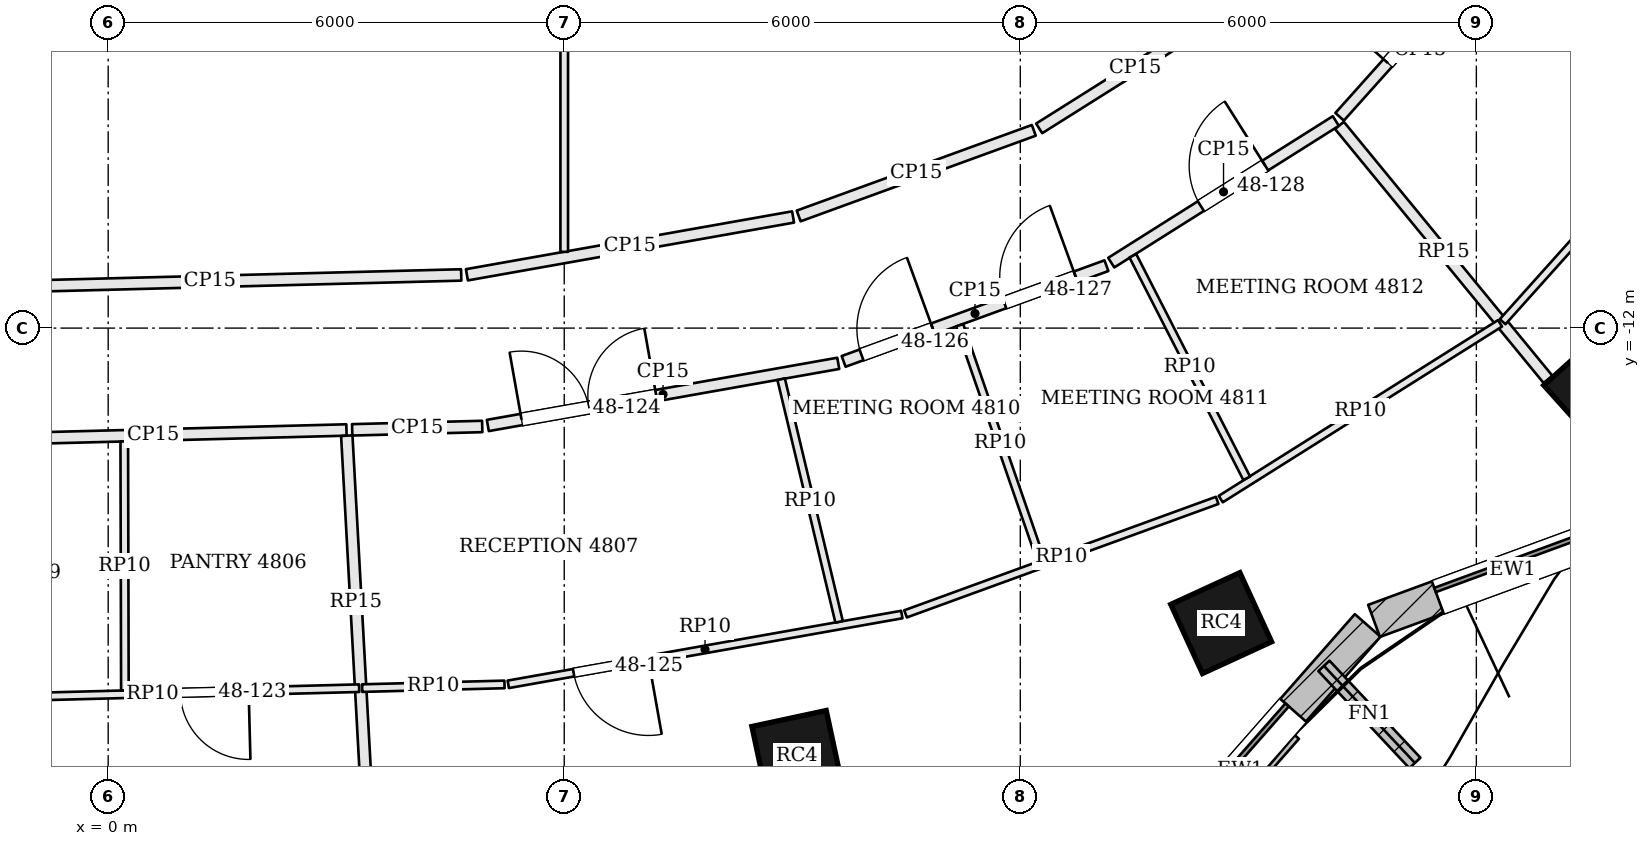
"""IFC4 building model, lengths in metres.
Left out: names, types, materials, properties, quantities, classifications, styles, units other than length and angle.
Written with IfcOpenShell. Run it as: python <this file> out.ifc"""

import sys

from ifc_helpers import new_model, si_unit, direction, frame, frame_2d, origin, origin_2d, place, context, subcontext, project, spatial, rectangle, extrude, element, fill, save


model = new_model("IFC4")
c1 = context("Model", 3, precision=1e-05, world=origin(), true_north=direction((0.0, 1.0)))
c2 = subcontext(c1, "Body", "Model", "MODEL_VIEW")
j1 = project(units=[si_unit("LENGTHUNIT", "METRE"), si_unit("PLANEANGLEUNIT", "RADIAN")], contexts=[c1])
p1 = place(None, origin())
s1 = spatial("IfcSite", under=j1, at=p1, CompositionType="ELEMENT")
p2 = place(p1, origin())
s2 = spatial("IfcBuilding", under=s1, at=p2, CompositionType="ELEMENT")
p3 = place(p2, frame((0.0, 0.0, 197.4)))
s3 = spatial("IfcBuildingStorey", under=s2, at=p3, CompositionType="ELEMENT", Elevation=197.4)
for number, where, z_axis, x_axis in (
    (1, (9.063, -17.625, 0.0), (0.0, 0.0, 1.0), (0.978, 0.21, 0.0)),
    (2, (14.643, -15.881, 0.0), (0.0, 0.0, 1.0), (0.909, 0.417, 0.0)),
    (3, (19.593, -12.79, 0.0), (0.0, 0.0, 1.0), (0.744, 0.668, 0.0)),
):
    element("IfcColumn", number, at=place(p3, frame(where, z_axis=z_axis, x_axis=x_axis)), inside=s3, PredefinedType="COLUMN", context=c2, shape_type="SweptSolid", body=[
        extrude(rectangle(XDim=1.0, YDim=1.0, at=origin_2d()), origin(), (0.0, 0.0, 1.0), 3.9),
    ])
p4 = place(p3, frame((13.221, -19.719, 0.0), z_axis=(0.0, 0.0, 1.0), x_axis=(0.660424908916, 0.750892095899, 0.0)))
e4 = element("IfcWall", 4, at=p4, inside=s3, PredefinedType="SOLIDWALL", context=c2, shape_type="SweptSolid", body=[
    extrude(rectangle(XDim=5.071, YDim=0.45, at=frame_2d((2.535, 0.0))), origin(), (0.0, 0.0, 1.0), 3.7),
])
p5 = place(p4, frame((1.485, 0.0, 0.9)))
e5 = element("IfcOpeningElement", 5, at=p5, cuts=e4, PredefinedType="OPENING", context=c2, shape_type="SweptSolid", body=[
    extrude(rectangle(XDim=2.1, YDim=2.3, at=frame_2d((1.05, 1.15))), frame((0.0, 0.235, 0.0), z_axis=(0.0, -1.0, 0.0), x_axis=(1.0, 0.0, 0.0)), (0.0, 0.0, 1.0), 0.47),
])
p6 = place(p3, frame((16.654, -15.852, 0.0), z_axis=(0.0, 0.0, 1.0), x_axis=(0.938636568132, 0.344907803572, 0.0)))
e6 = element("IfcWall", 6, at=p6, inside=s3, PredefinedType="SOLIDWALL", context=c2, shape_type="SweptSolid", body=[
    extrude(rectangle(XDim=3.887, YDim=0.45, at=frame_2d((1.944, 0.0))), origin(), (0.0, 0.0, 1.0), 3.7),
])
p7 = place(p6, frame((0.894, 0.0, 0.9)))
e7 = element("IfcOpeningElement", 7, at=p7, cuts=e6, PredefinedType="OPENING", context=c2, shape_type="SweptSolid", body=[
    extrude(rectangle(XDim=2.1, YDim=2.3, at=frame_2d((1.05, 1.15))), frame((0.0, 0.235, 0.0), z_axis=(0.0, -1.0, 0.0), x_axis=(1.0, 0.0, 0.0)), (0.0, 0.0, 1.0), 0.47),
])
p8 = place(p3, frame((15.995, -16.444, 0.0), z_axis=(0.0, 0.0, 1.0), x_axis=(0.683852936488, -0.729619874494, 0.0)))
e8 = element("IfcWall", 8, at=p8, inside=s3, PredefinedType="SOLIDWALL", context=c2, shape_type="SweptSolid", body=[
    extrude(rectangle(XDim=1.75, YDim=0.2, at=frame_2d((0.875, 0.0))), origin(), (0.0, 0.0, 1.0), 3.7),
])
p9 = place(p3, frame((13.339, -19.822, 3.9), z_axis=(0.0, 0.0, 1.0), x_axis=(0.660445690116, 0.7508738179, 0.0)))
e9 = element("IfcWall", 9, at=p9, inside=s3, PredefinedType="PARAPET", context=c2, shape_type="SweptSolid", body=[
    extrude(rectangle(XDim=3.353, YDim=0.3, at=frame_2d((1.677, 0.0))), origin(), (0.0, 0.0, 1.0), 1.1),
])
p10 = place(p3, frame((-1.951, -13.472, 0.0), z_axis=(0.0, 0.0, 1.0), x_axis=(0.999664235233, 0.025911711565, 0.0)))
e10 = element("IfcWall", 10, at=p10, inside=s3, PredefinedType="PARTITIONING", context=c2, shape_type="SweptSolid", body=[
    extrude(rectangle(XDim=5.088, YDim=0.15, at=frame_2d((2.544, 0.0))), origin(), (0.0, 0.0, 1.0), 3.084),
])
p11 = place(p3, frame((3.38, -17.801, 0.0), z_axis=(0.0, 0.0, 1.0), x_axis=(-0.054860476936, 0.998494030062, 0.0)))
e11 = element("IfcWall", 11, at=p11, inside=s3, PredefinedType="PARTITIONING", context=c2, shape_type="SweptSolid", body=[
    extrude(rectangle(XDim=4.392, YDim=0.15, at=frame_2d((2.196, 0.0))), origin(), (0.0, 0.0, 1.0), 3.084),
])
p12 = place(p3, frame((3.21, -13.339, 0.0), z_axis=(0.0, 0.0, 1.0), x_axis=(0.999662941738, 0.025961566124, 0.0)))
e12 = element("IfcWall", 12, at=p12, inside=s3, PredefinedType="PARTITIONING", context=c2, shape_type="SweptSolid", body=[
    extrude(rectangle(XDim=1.711, YDim=0.15, at=frame_2d((0.856, 0.0))), origin(), (0.0, 0.0, 1.0), 3.084),
])
p13 = place(p3, frame((4.995, -13.281, 0.0), z_axis=(0.0, 0.0, 1.0), x_axis=(0.98463411377, 0.174630071865, 0.0)))
e13 = element("IfcWall", 13, at=p13, inside=s3, PredefinedType="PARTITIONING", context=c2, shape_type="SweptSolid", body=[
    extrude(rectangle(XDim=4.682, YDim=0.15, at=frame_2d((2.341, 0.0))), origin(), (0.0, 0.0, 1.0), 3.084),
])
p14 = place(p13, frame((0.45, 0.0, 0.0)))
e14 = element("IfcOpeningElement", 14, at=p14, cuts=e13, PredefinedType="OPENING", context=c2, shape_type="SweptSolid", body=[
    extrude(rectangle(XDim=1.8, YDim=2.1, at=frame_2d((0.9, 1.05))), frame((0.0, 0.085, 0.0), z_axis=(0.0, -1.0, 0.0), x_axis=(1.0, 0.0, 0.0)), (0.0, 0.0, 1.0), 0.17),
])
p15 = place(p3, frame((9.676, -12.438, 0.0), z_axis=(0.0, 0.0, 1.0), x_axis=(0.939640289748, 0.342163887461, 0.0)))
e15 = element("IfcWall", 15, at=p15, inside=s3, PredefinedType="PARTITIONING", context=c2, shape_type="SweptSolid", body=[
    extrude(rectangle(XDim=3.68, YDim=0.15, at=frame_2d((1.84, 0.0))), origin(), (0.0, 0.0, 1.0), 3.084),
])
p16 = place(p15, frame((0.25, 0.0, 0.0)))
e16 = element("IfcOpeningElement", 16, at=p16, cuts=e15, PredefinedType="OPENING", context=c2, shape_type="SweptSolid", body=[
    extrude(rectangle(XDim=1.0, YDim=2.4, at=frame_2d((0.5, 1.2))), frame((0.0, 0.085, 0.0), z_axis=(0.0, -1.0, 0.0), x_axis=(1.0, 0.0, 0.0)), (0.0, 0.0, 1.0), 0.17),
])
p17 = place(p15, frame((2.25, 0.0, 0.0)))
e17 = element("IfcOpeningElement", 17, at=p17, cuts=e15, PredefinedType="OPENING", context=c2, shape_type="SweptSolid", body=[
    extrude(rectangle(XDim=1.0, YDim=2.4, at=frame_2d((0.5, 1.2))), frame((0.0, 0.085, 0.0), z_axis=(0.0, -1.0, 0.0), x_axis=(1.0, 0.0, 0.0)), (0.0, 0.0, 1.0), 0.17),
])
p18 = place(p3, frame((13.197, -11.139, 0.0), z_axis=(0.0, 0.0, 1.0), x_axis=(0.845847451173, 0.533424867572, 0.0)))
e18 = element("IfcWall", 18, at=p18, inside=s3, PredefinedType="PARTITIONING", context=c2, shape_type="SweptSolid", body=[
    extrude(rectangle(XDim=3.493, YDim=0.15, at=frame_2d((1.747, 0.0))), origin(), (0.0, 0.0, 1.0), 3.084),
])
p19 = place(p18, frame((1.394, 0.0, 0.0)))
e19 = element("IfcOpeningElement", 19, at=p19, cuts=e18, PredefinedType="OPENING", context=c2, shape_type="SweptSolid", body=[
    extrude(rectangle(XDim=1.0, YDim=2.4, at=frame_2d((0.5, 1.2))), frame((0.0, 0.085, 0.0), z_axis=(0.0, -1.0, 0.0), x_axis=(1.0, 0.0, 0.0)), (0.0, 0.0, 1.0), 0.17),
])
p20 = place(p3, frame((18.943, -12.675, 0.0), z_axis=(0.0, 0.0, 1.0), x_axis=(-0.634730994321, 0.772733178301, 0.0)))
e20 = element("IfcWall", 20, at=p20, inside=s3, PredefinedType="PARTITIONING", context=c2, shape_type="SweptSolid", body=[
    extrude(rectangle(XDim=4.324, YDim=0.15, at=frame_2d((2.162, 0.0))), origin(), (0.0, 0.0, 1.0), 3.084),
])
p21 = place(p3, frame((16.201, -9.22, 0.0), z_axis=(0.0, 0.0, 1.0), x_axis=(0.666925083627, 0.745124776685, 0.0)))
e21 = element("IfcWall", 21, at=p21, inside=s3, PredefinedType="PARTITIONING", context=c2, shape_type="SweptSolid", body=[
    extrude(rectangle(XDim=3.178, YDim=0.15, at=frame_2d((1.589, 0.0))), origin(), (0.0, 0.0, 1.0), 3.084),
])
p22 = place(p21, frame((0.95, 0.0, 0.0)))
e22 = element("IfcOpeningElement", 22, at=p22, cuts=e21, PredefinedType="OPENING", context=c2, shape_type="SweptSolid", body=[
    extrude(rectangle(XDim=1.8, YDim=2.1, at=frame_2d((0.9, 1.05))), frame((0.0, 0.085, 0.0), z_axis=(0.0, -1.0, 0.0), x_axis=(1.0, 0.0, 0.0)), (0.0, 0.0, 1.0), 0.17),
])
p23 = place(p3, frame((14.777, -7.781, 0.0), z_axis=(0.0, 0.0, 1.0), x_axis=(-0.846359741043, -0.532611667862, 0.0)))
e23 = element("IfcWall", 23, at=p23, inside=s3, PredefinedType="PARTITIONING", context=c2, shape_type="SweptSolid", body=[
    extrude(rectangle(XDim=2.987, YDim=0.15, at=frame_2d((1.494, 0.0))), origin(), (0.0, 0.0, 1.0), 3.084),
])
p24 = place(p3, frame((12.178, -9.398, 0.0), z_axis=(0.0, 0.0, 1.0), x_axis=(-0.939609240084, -0.342249143093, 0.0)))
e24 = element("IfcWall", 24, at=p24, inside=s3, PredefinedType="PARTITIONING", context=c2, shape_type="SweptSolid", body=[
    extrude(rectangle(XDim=3.292, YDim=0.15, at=frame_2d((1.646, 0.0))), origin(), (0.0, 0.0, 1.0), 3.084),
])
p25 = place(p3, frame((9.01, -10.538, 0.0), z_axis=(0.0, 0.0, 1.0), x_axis=(-0.984645638575, -0.174565077936, 0.0)))
e25 = element("IfcWall", 25, at=p25, inside=s3, PredefinedType="PARTITIONING", context=c2, shape_type="SweptSolid", body=[
    extrude(rectangle(XDim=4.358, YDim=0.15, at=frame_2d((2.179, 0.0))), origin(), (0.0, 0.0, 1.0), 3.084),
])
p26 = place(p3, frame((4.645, -11.301, 0.0), z_axis=(0.0, 0.0, 1.0), x_axis=(-0.9996648469, -0.02588810291, 0.0)))
e26 = element("IfcWall", 26, at=p26, inside=s3, PredefinedType="PARTITIONING", context=c2, shape_type="SweptSolid", body=[
    extrude(rectangle(XDim=6.611, YDim=0.15, at=frame_2d((3.305, 0.0))), origin(), (0.0, 0.0, 1.0), 3.084),
])
p27 = place(p3, frame((3.302, -16.737, 0.0), z_axis=(0.0, 0.0, 1.0), x_axis=(-0.999665233763, -0.025873159948, 0.0)))
e27 = element("IfcWall", 27, at=p27, inside=s3, PredefinedType="PARTITIONING", context=c2, shape_type="SweptSolid", body=[
    extrude(rectangle(XDim=5.435, YDim=0.1, at=frame_2d((2.718, 0.0))), origin(), (0.0, 0.0, 1.0), 3.084),
])
p28 = place(p27, frame((1.454, 0.0, 0.0)))
e28 = element("IfcOpeningElement", 28, at=p28, cuts=e27, PredefinedType="OPENING", context=c2, shape_type="SweptSolid", body=[
    extrude(rectangle(XDim=0.9, YDim=2.1, at=frame_2d((0.45, 1.05))), frame((0.0, 0.06, 0.0), z_axis=(0.0, -1.0, 0.0), x_axis=(1.0, 0.0, 0.0)), (0.0, 0.0, 1.0), 0.12),
])
p29 = place(p3, frame((0.212, -13.491, 0.0), z_axis=(0.0, 0.0, 1.0), x_axis=(0.002533901539, -0.999996789666, 0.0)))
e29 = element("IfcWall", 29, at=p29, inside=s3, PredefinedType="PARTITIONING", context=c2, shape_type="SweptSolid", body=[
    extrude(rectangle(XDim=3.276, YDim=0.1, at=frame_2d((1.638, 0.0))), origin(), (0.0, 0.0, 1.0), 3.084),
])
p30 = place(p3, frame((18.312, -11.938, 0.0), z_axis=(0.0, 0.0, 1.0), x_axis=(-0.846383069278, -0.532574595752, 0.0)))
e30 = element("IfcWall", 30, at=p30, inside=s3, PredefinedType="PARTITIONING", context=c2, shape_type="SweptSolid", body=[
    extrude(rectangle(XDim=4.341, YDim=0.1, at=frame_2d((2.171, 0.0))), origin(), (0.0, 0.0, 1.0), 3.084),
])
p31 = place(p3, frame((14.59, -14.267, 0.0), z_axis=(0.0, 0.0, 1.0), x_axis=(-0.939623405418, -0.342210251148, 0.0)))
e31 = element("IfcWall", 31, at=p31, inside=s3, PredefinedType="PARTITIONING", context=c2, shape_type="SweptSolid", body=[
    extrude(rectangle(XDim=4.363, YDim=0.1, at=frame_2d((2.182, 0.0))), origin(), (0.0, 0.0, 1.0), 3.084),
])
p32 = place(p3, frame((10.441, -15.769, 0.0), z_axis=(0.0, 0.0, 1.0), x_axis=(-0.984642067447, -0.174585219919, 0.0)))
e32 = element("IfcWall", 32, at=p32, inside=s3, PredefinedType="PARTITIONING", context=c2, shape_type="SweptSolid", body=[
    extrude(rectangle(XDim=5.258, YDim=0.1, at=frame_2d((2.629, 0.0))), origin(), (0.0, 0.0, 1.0), 3.084),
])
p33 = place(p32, frame((3.385, 0.0, 0.0)))
e33 = element("IfcOpeningElement", 33, at=p33, cuts=e32, PredefinedType="OPENING", context=c2, shape_type="SweptSolid", body=[
    extrude(rectangle(XDim=1.0, YDim=2.1, at=frame_2d((0.5, 1.05))), frame((0.0, 0.06, 0.0), z_axis=(0.0, -1.0, 0.0), x_axis=(1.0, 0.0, 0.0)), (0.0, 0.0, 1.0), 0.12),
])
p34 = place(p3, frame((5.214, -16.688, 0.0), z_axis=(0.0, 0.0, 1.0), x_axis=(-0.99966341664, -0.025943273332, 0.0)))
e34 = element("IfcWall", 34, at=p34, inside=s3, PredefinedType="PARTITIONING", context=c2, shape_type="SweptSolid", body=[
    extrude(rectangle(XDim=1.873, YDim=0.1, at=frame_2d((0.937, 0.0))), origin(), (0.0, 0.0, 1.0), 3.084),
])
p35 = place(p3, frame((8.854, -12.673, 0.0), z_axis=(0.0, 0.0, 1.0), x_axis=(0.23231460878, -0.972640695502, 0.0)))
e35 = element("IfcWall", 35, at=p35, inside=s3, PredefinedType="PARTITIONING", context=c2, shape_type="SweptSolid", body=[
    extrude(rectangle(XDim=3.281, YDim=0.1, at=frame_2d((1.641, 0.0))), origin(), (0.0, 0.0, 1.0), 3.084),
])
p36 = place(p3, frame((11.201, -11.962, 0.0), z_axis=(0.0, 0.0, 1.0), x_axis=(0.32685198031, -0.945075543524, 0.0)))
e36 = element("IfcWall", 36, at=p36, inside=s3, PredefinedType="PARTITIONING", context=c2, shape_type="SweptSolid", body=[
    extrude(rectangle(XDim=3.275, YDim=0.1, at=frame_2d((1.638, 0.0))), origin(), (0.0, 0.0, 1.0), 3.084),
])
p37 = place(p3, frame((13.481, -11.048, 0.0), z_axis=(0.0, 0.0, 1.0), x_axis=(0.455538746767, -0.890215957054, 0.0)))
e37 = element("IfcWall", 37, at=p37, inside=s3, PredefinedType="PARTITIONING", context=c2, shape_type="SweptSolid", body=[
    extrude(rectangle(XDim=3.289, YDim=0.1, at=frame_2d((1.644, 0.0))), origin(), (0.0, 0.0, 1.0), 3.084),
])
p38 = place(p3, frame((21.149, -8.789, 0.0), z_axis=(0.0, 0.0, 1.0), x_axis=(-0.667605024822, -0.744515635049, 0.0)))
e38 = element("IfcWall", 38, at=p38, inside=s3, PredefinedType="PARTITIONING", context=c2, shape_type="SweptSolid", body=[
    extrude(rectangle(XDim=4.2, YDim=0.1, at=frame_2d((2.1, 0.0))), origin(), (0.0, 0.0, 1.0), 3.084),
])
p39 = place(p38, frame((0.733, 0.0, 0.0)))
e39 = element("IfcOpeningElement", 39, at=p39, cuts=e38, PredefinedType="OPENING", context=c2, shape_type="SweptSolid", body=[
    extrude(rectangle(XDim=1.0, YDim=2.1, at=frame_2d((0.5, 1.05))), frame((0.0, 0.06, 0.0), z_axis=(0.0, -1.0, 0.0), x_axis=(1.0, 0.0, 0.0)), (0.0, 0.0, 1.0), 0.12),
])
p40 = place(p3, frame((6.0, -10.997, 0.0), z_axis=(0.0, 0.0, 1.0), x_axis=(0.0, 1.0, 0.0)))
e40 = element("IfcWall", 40, at=p40, inside=s3, PredefinedType="PARTITIONING", context=c2, shape_type="SweptSolid", body=[
    extrude(rectangle(XDim=5.922, YDim=0.1, at=frame_2d((2.961, 0.0))), origin(), (0.0, 0.0, 1.0), 3.084),
])
p41 = place(p5, origin())
e41 = element("IfcWindow", 41, at=p41, inside=s3, PartitioningType="SINGLE_PANEL", PredefinedType="WINDOW", context=c2, shape_type="SweptSolid", body=[
    extrude(rectangle(XDim=2.1, YDim=2.3, at=frame_2d((1.05, 1.15))), frame((0.0, 0.135, 0.0), z_axis=(0.0, -1.0, 0.0), x_axis=(1.0, 0.0, 0.0)), (0.0, 0.0, 1.0), 0.06),
])
fill(e5, e41)
p42 = place(p7, origin())
e42 = element("IfcWindow", 42, at=p42, inside=s3, PartitioningType="SINGLE_PANEL", PredefinedType="WINDOW", context=c2, shape_type="SweptSolid", body=[
    extrude(rectangle(XDim=2.1, YDim=2.3, at=frame_2d((1.05, 1.15))), frame((0.0, 0.135, 0.0), z_axis=(0.0, -1.0, 0.0), x_axis=(1.0, 0.0, 0.0)), (0.0, 0.0, 1.0), 0.06),
])
fill(e7, e42)
p43 = place(p28, origin())
e43 = element("IfcDoor", 43, at=p43, inside=s3, OperationType="SINGLE_SWING_LEFT", PredefinedType="DOOR", context=c2, shape_type="SweptSolid", body=[
    extrude(rectangle(XDim=0.9, YDim=2.1, at=frame_2d((0.45, 1.05))), frame((0.0, 0.025, 0.0), z_axis=(0.0, -1.0, 0.0), x_axis=(1.0, 0.0, 0.0)), (0.0, 0.0, 1.0), 0.05),
])
fill(e28, e43)
p44 = place(p14, origin())
e44 = element("IfcDoor", 44, at=p44, inside=s3, OperationType="DOUBLE_DOOR_SINGLE_SWING", PredefinedType="DOOR", context=c2, shape_type="SweptSolid", body=[
    extrude(rectangle(XDim=1.8, YDim=2.1, at=frame_2d((0.9, 1.05))), frame((0.0, 0.025, 0.0), z_axis=(0.0, -1.0, 0.0), x_axis=(1.0, 0.0, 0.0)), (0.0, 0.0, 1.0), 0.05),
])
fill(e14, e44)
p45 = place(p33, origin())
e45 = element("IfcDoor", 45, at=p45, inside=s3, OperationType="SINGLE_SWING_LEFT", PredefinedType="DOOR", context=c2, shape_type="SweptSolid", body=[
    extrude(rectangle(XDim=1.0, YDim=2.1, at=frame_2d((0.5, 1.05))), frame((0.0, 0.025, 0.0), z_axis=(0.0, -1.0, 0.0), x_axis=(1.0, 0.0, 0.0)), (0.0, 0.0, 1.0), 0.05),
])
fill(e33, e45)
p46 = place(p16, origin())
e46 = element("IfcDoor", 46, at=p46, inside=s3, OperationType="SINGLE_SWING_RIGHT", PredefinedType="DOOR", context=c2, shape_type="SweptSolid", body=[
    extrude(rectangle(XDim=1.0, YDim=2.4, at=frame_2d((0.5, 1.2))), frame((0.0, 0.025, 0.0), z_axis=(0.0, -1.0, 0.0), x_axis=(1.0, 0.0, 0.0)), (0.0, 0.0, 1.0), 0.05),
])
fill(e16, e46)
p47 = place(p17, origin())
e47 = element("IfcDoor", 47, at=p47, inside=s3, OperationType="SINGLE_SWING_RIGHT", PredefinedType="DOOR", context=c2, shape_type="SweptSolid", body=[
    extrude(rectangle(XDim=1.0, YDim=2.4, at=frame_2d((0.5, 1.2))), frame((0.0, 0.025, 0.0), z_axis=(0.0, -1.0, 0.0), x_axis=(1.0, 0.0, 0.0)), (0.0, 0.0, 1.0), 0.05),
])
fill(e17, e47)
p48 = place(p19, origin())
e48 = element("IfcDoor", 48, at=p48, inside=s3, OperationType="SINGLE_SWING_RIGHT", PredefinedType="DOOR", context=c2, shape_type="SweptSolid", body=[
    extrude(rectangle(XDim=1.0, YDim=2.4, at=frame_2d((0.5, 1.2))), frame((0.0, 0.025, 0.0), z_axis=(0.0, -1.0, 0.0), x_axis=(1.0, 0.0, 0.0)), (0.0, 0.0, 1.0), 0.05),
])
fill(e19, e48)
p49 = place(p22, origin())
e49 = element("IfcDoor", 49, at=p49, inside=s3, OperationType="DOUBLE_DOOR_SINGLE_SWING", PredefinedType="DOOR", context=c2, shape_type="SweptSolid", body=[
    extrude(rectangle(XDim=1.8, YDim=2.1, at=frame_2d((0.9, 1.05))), frame((0.0, 0.025, 0.0), z_axis=(0.0, -1.0, 0.0), x_axis=(1.0, 0.0, 0.0)), (0.0, 0.0, 1.0), 0.05),
])
fill(e22, e49)
save(model, sys.argv[1])
